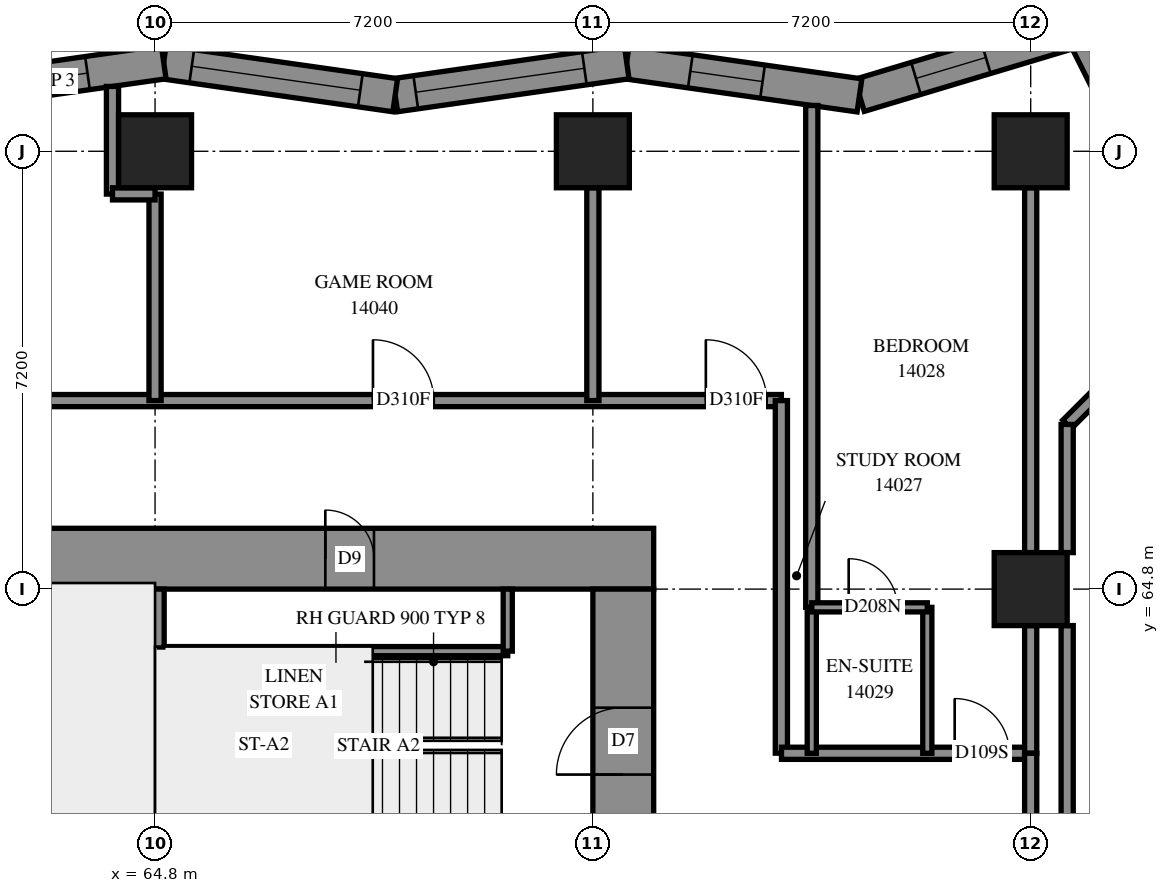
"""IFC4 building model, lengths in metres.
Left out: names, types, materials, properties, quantities, classifications, styles, units other than length and angle.
Written with IfcOpenShell. Run it as: python <this file> out.ifc"""

import sys

from ifc_helpers import new_model, si_unit, direction, frame, frame_2d, origin, origin_2d, place, context, subcontext, project, spatial, polyline, rectangle, outline, extrude, element, fill, save


model = new_model("IFC4")
c1 = context("Model", 3, precision=1e-05, world=origin(), true_north=direction((0.0, 1.0)))
c2 = subcontext(c1, "Body", "Model", "MODEL_VIEW")
j1 = project(units=[si_unit("LENGTHUNIT", "METRE"), si_unit("PLANEANGLEUNIT", "RADIAN")], contexts=[c1])
p1 = place(None, origin())
s1 = spatial("IfcSite", under=j1, at=p1, CompositionType="ELEMENT")
p2 = place(p1, origin())
s2 = spatial("IfcBuilding", under=s1, at=p2, CompositionType="ELEMENT")
p3 = place(p2, frame((0.0, 0.0, 54.2)))
s3 = spatial("IfcBuildingStorey", under=s2, at=p3, CompositionType="ELEMENT", Elevation=54.2)
for number, where, z_axis, x_axis in (
    (1, (64.8, 72.0, 0.0), (0.0, 0.0, 1.0), (1.0, 0.0, 0.0)),
    (2, (72.0, 72.0, 0.0), (0.0, 0.0, 1.0), (1.0, 0.0, 0.0)),
    (3, (79.2, 64.8, 0.0), (0.0, 0.0, 1.0), (1.0, 0.0, 0.0)),
    (4, (79.2, 72.0, 0.0), (0.0, 0.0, 1.0), (1.0, 0.0, 0.0)),
):
    element("IfcColumn", number, at=place(p3, frame(where, z_axis=z_axis, x_axis=x_axis)), inside=s3, PredefinedType="COLUMN", context=c2, shape_type="SweptSolid", body=[
        extrude(rectangle(XDim=1.2, YDim=1.2, at=origin_2d()), origin(), (0.0, 0.0, 1.0), 3.1),
    ])
p4 = place(p3, frame((56.6, 65.3, -0.3), z_axis=(0.0, 0.0, 1.0), x_axis=(1.0, 0.0, 0.0)))
e5 = element("IfcWall", 5, at=p4, inside=s3, PredefinedType="SHEAR", context=c2, shape_type="SweptSolid", body=[
    extrude(rectangle(XDim=16.4, YDim=1.0, at=frame_2d((8.2, 0.0))), origin(), (0.0, 0.0, 1.0), 2.7),
])
p5 = place(p4, frame((11.0, 0.0, 0.3)))
e6 = element("IfcOpeningElement", 6, at=p5, cuts=e5, PredefinedType="OPENING", context=c2, shape_type="SweptSolid", body=[
    extrude(rectangle(XDim=0.8, YDim=2.1, at=frame_2d((0.4, 1.05))), frame((0.0, 0.51, 0.0), z_axis=(0.0, -1.0, 0.0), x_axis=(1.0, 0.0, 0.0)), (0.0, 0.0, 1.0), 1.02),
])
p6 = place(p3, frame((72.5, 50.4, -0.3), z_axis=(0.0, 0.0, 1.0), x_axis=(0.0, 1.0, 0.0)))
e7 = element("IfcWall", 7, at=p6, inside=s3, PredefinedType="SHEAR", context=c2, shape_type="SweptSolid", body=[
    extrude(rectangle(XDim=14.4, YDim=1.0, at=frame_2d((7.2, 0.0))), origin(), (0.0, 0.0, 1.0), 2.7),
])
p7 = place(p6, frame((4.55, 0.0, 0.3)))
e8 = element("IfcOpeningElement", 8, at=p7, cuts=e7, PredefinedType="OPENING", context=c2, shape_type="SweptSolid", body=[
    extrude(rectangle(XDim=1.1, YDim=2.1, at=frame_2d((0.55, 1.05))), frame((0.0, 0.51, 0.0), z_axis=(0.0, -1.0, 0.0), x_axis=(1.0, 0.0, 0.0)), (0.0, 0.0, 1.0), 1.02),
])
p8 = place(p6, frame((11.35, 0.0, 0.3)))
e9 = element("IfcOpeningElement", 9, at=p8, cuts=e7, PredefinedType="OPENING", context=c2, shape_type="SweptSolid", body=[
    extrude(rectangle(XDim=1.1, YDim=2.1, at=frame_2d((0.55, 1.05))), frame((0.0, 0.51, 0.0), z_axis=(0.0, -1.0, 0.0), x_axis=(1.0, 0.0, 0.0)), (0.0, 0.0, 1.0), 1.02),
])
p9 = place(p3, frame((64.8, 60.6, 0.0), z_axis=(0.0, 0.0, 1.0), x_axis=(0.0, 1.0, 0.0)))
e10 = element("IfcWall", 10, at=p9, inside=s3, PredefinedType="SOLIDWALL", context=c2, shape_type="SweptSolid", body=[
    extrude(rectangle(XDim=4.2, YDim=0.3, at=frame_2d((2.1, 0.0))), origin(), (0.0, 0.0, 1.0), 3.1),
])
p10 = place(p3, frame((81.576, 70.922, 0.0), z_axis=(0.0, 0.0, 1.0), x_axis=(-0.4479656887, 0.894050749, 0.0)))
e11 = element("IfcWall", 11, at=p10, inside=s3, PredefinedType="SOLIDWALL", context=c2, shape_type="SweptSolid", body=[
    extrude(outline(polyline([(0.067, -0.275), (3.687, -0.275), (3.225, 0.275), (-0.067, 0.275), (0.067, -0.275)])), origin(), (0.0, 0.0, 1.0), 3.1),
])
p11 = place(p10, frame((0.787, 0.0, 0.5)))
e12 = element("IfcOpeningElement", 12, at=p11, cuts=e11, PredefinedType="OPENING", context=c2, shape_type="SweptSolid", body=[
    extrude(rectangle(XDim=1.2, YDim=2.45, at=frame_2d((0.6, 1.225))), frame((0.0, 0.285, 0.0), z_axis=(0.0, -1.0, 0.0), x_axis=(1.0, 0.0, 0.0)), (0.0, 0.0, 1.0), 0.57),
])
p12 = place(p3, frame((80.028, 74.012, 0.0), z_axis=(0.0, 0.0, 1.0), x_axis=(-0.9578320732, -0.2873285915, 0.0)))
e13 = element("IfcWall", 13, at=p12, inside=s3, PredefinedType="SOLIDWALL", context=c2, shape_type="SweptSolid", body=[
    extrude(outline(polyline([(-0.231, -0.275), (3.744, -0.275), (3.864, 0.275), (0.231, 0.275), (-0.231, -0.275)])), origin(), (0.0, 0.0, 1.0), 3.1),
])
p13 = place(p12, frame((1.634, 0.0, 0.5)))
e14 = element("IfcOpeningElement", 14, at=p13, cuts=e13, PredefinedType="OPENING", context=c2, shape_type="SweptSolid", body=[
    extrude(rectangle(XDim=1.2, YDim=2.45, at=frame_2d((0.6, 1.225))), frame((0.0, 0.285, 0.0), z_axis=(0.0, -1.0, 0.0), x_axis=(1.0, 0.0, 0.0)), (0.0, 0.0, 1.0), 0.57),
])
p14 = place(p3, frame((76.384, 72.919, 0.0), z_axis=(0.0, 0.0, 1.0), x_axis=(-0.9900171381, 0.1409470338, 0.0)))
e15 = element("IfcWall", 15, at=p14, inside=s3, PredefinedType="SOLIDWALL", context=c2, shape_type="SweptSolid", body=[
    extrude(outline(polyline([(0.06, -0.275), (3.906, -0.275), (3.828, 0.275), (-0.06, 0.275), (0.06, -0.275)])), origin(), (0.0, 0.0, 1.0), 3.1),
])
p15 = place(p14, frame((1.61, 0.0, 0.5)))
e16 = element("IfcOpeningElement", 16, at=p15, cuts=e15, PredefinedType="OPENING", context=c2, shape_type="SweptSolid", body=[
    extrude(rectangle(XDim=1.2, YDim=2.45, at=frame_2d((0.6, 1.225))), frame((0.0, 0.285, 0.0), z_axis=(0.0, -1.0, 0.0), x_axis=(1.0, 0.0, 0.0)), (0.0, 0.0, 1.0), 0.57),
])
p16 = place(p3, frame((72.556, 73.464, 0.0), z_axis=(0.0, 0.0, 1.0), x_axis=(-0.990016994, -0.1409480459, 0.0)))
e17 = element("IfcWall", 17, at=p16, inside=s3, PredefinedType="SOLIDWALL", context=c2, shape_type="SweptSolid", body=[
    extrude(outline(polyline([(-0.039, -0.275), (3.806, -0.275), (3.885, 0.275), (0.039, 0.275), (-0.039, -0.275)])), origin(), (0.0, 0.0, 1.0), 3.1),
])
p17 = place(p16, frame((0.704, 0.0, 0.5)))
e18 = element("IfcOpeningElement", 18, at=p17, cuts=e17, PredefinedType="OPENING", context=c2, shape_type="SweptSolid", body=[
    extrude(rectangle(XDim=2.8, YDim=2.45, at=frame_2d((1.4, 1.225))), frame((0.0, 0.285, 0.0), z_axis=(0.0, -1.0, 0.0), x_axis=(1.0, 0.0, 0.0)), (0.0, 0.0, 1.0), 0.57),
])
p18 = place(p3, frame((68.749, 72.922, 0.0), z_axis=(0.0, 0.0, 1.0), x_axis=(-0.990016994, 0.1409480459, 0.0)))
e19 = element("IfcWall", 19, at=p18, inside=s3, PredefinedType="SOLIDWALL", context=c2, shape_type="SweptSolid", body=[
    extrude(outline(polyline([(0.039, -0.275), (3.885, -0.275), (3.806, 0.275), (-0.039, 0.275), (0.039, -0.275)])), origin(), (0.0, 0.0, 1.0), 3.1),
])
p19 = place(p18, frame((0.579, 0.0, 0.5)))
e20 = element("IfcOpeningElement", 20, at=p19, cuts=e19, PredefinedType="OPENING", context=c2, shape_type="SweptSolid", body=[
    extrude(rectangle(XDim=2.8, YDim=2.45, at=frame_2d((1.4, 1.225))), frame((0.0, 0.285, 0.0), z_axis=(0.0, -1.0, 0.0), x_axis=(1.0, 0.0, 0.0)), (0.0, 0.0, 1.0), 0.57),
])
p20 = place(p3, frame((64.942, 73.464, 0.0), z_axis=(0.0, 0.0, 1.0), x_axis=(-0.990016994, -0.1409480459, 0.0)))
e21 = element("IfcWall", 21, at=p20, inside=s3, PredefinedType="SOLIDWALL", context=c2, shape_type="SweptSolid", body=[
    extrude(outline(polyline([(-0.039, -0.275), (3.806, -0.275), (3.885, 0.275), (0.039, 0.275), (-0.039, -0.275)])), origin(), (0.0, 0.0, 1.0), 3.1),
])
p21 = place(p20, frame((1.266, 0.0, 0.7)))
e22 = element("IfcOpeningElement", 22, at=p21, cuts=e21, PredefinedType="OPENING", context=c2, shape_type="SweptSolid", body=[
    extrude(rectangle(XDim=1.8, YDim=2.2, at=frame_2d((0.9, 1.1))), frame((0.0, 0.285, 0.0), z_axis=(0.0, -1.0, 0.0), x_axis=(1.0, 0.0, 0.0)), (0.0, 0.0, 1.0), 0.57),
])
p22 = place(p3, frame((64.95, 63.78, 0.0), z_axis=(0.0, 0.0, 1.0), x_axis=(1.0, 0.0, 0.0)))
e23 = element("IfcWall", 23, at=p22, inside=s3, PredefinedType="PARTITIONING", context=c2, shape_type="SweptSolid", body=[
    extrude(rectangle(XDim=5.65, YDim=0.15, at=frame_2d((2.825, 0.0))), origin(), (0.0, 0.0, 1.0), 3.1),
])
p23 = place(p3, frame((70.6, 63.78, 0.0), z_axis=(0.0, 0.0, 1.0), x_axis=(0.0, 1.0, 0.0)))
e24 = element("IfcWall", 24, at=p23, inside=s3, PredefinedType="PARTITIONING", context=c2, shape_type="SweptSolid", body=[
    extrude(rectangle(XDim=1.02, YDim=0.15, at=frame_2d((0.51, 0.0))), origin(), (0.0, 0.0, 1.0), 3.1),
])
p24 = place(p3, frame((54.5, 67.9, 0.0), z_axis=(0.0, 0.0, 1.0), x_axis=(1.0, 0.0, 0.0)))
e25 = element("IfcWall", 25, at=p24, inside=s3, PredefinedType="PARTITIONING", context=c2, shape_type="SweptSolid", body=[
    extrude(rectangle(XDim=20.6, YDim=0.2, at=frame_2d((10.3, 0.0))), origin(), (0.0, 0.0, 1.0), 3.1),
])
p25 = place(p24, frame((0.198, 0.0, 0.0)))
e26 = element("IfcOpeningElement", 26, at=p25, cuts=e25, PredefinedType="OPENING", context=c2, shape_type="SweptSolid", body=[
    extrude(rectangle(XDim=1.0, YDim=2.1, at=frame_2d((0.5, 1.05))), frame((0.0, 0.11, 0.0), z_axis=(0.0, -1.0, 0.0), x_axis=(1.0, 0.0, 0.0)), (0.0, 0.0, 1.0), 0.22),
])
p26 = place(p24, frame((19.358, 0.0, 0.0)))
e27 = element("IfcOpeningElement", 27, at=p26, cuts=e25, PredefinedType="OPENING", context=c2, shape_type="SweptSolid", body=[
    extrude(rectangle(XDim=1.0, YDim=2.1, at=frame_2d((0.5, 1.05))), frame((0.0, 0.11, 0.0), z_axis=(0.0, -1.0, 0.0), x_axis=(1.0, 0.0, 0.0)), (0.0, 0.0, 1.0), 0.22),
])
p27 = place(p24, frame((6.698, 0.0, 0.0)))
e28 = element("IfcOpeningElement", 28, at=p27, cuts=e25, PredefinedType="OPENING", context=c2, shape_type="SweptSolid", body=[
    extrude(rectangle(XDim=0.9, YDim=2.1, at=frame_2d((0.45, 1.05))), frame((0.0, 0.11, 0.0), z_axis=(0.0, -1.0, 0.0), x_axis=(1.0, 0.0, 0.0)), (0.0, 0.0, 1.0), 0.22),
])
p28 = place(p24, frame((13.884, 0.0, 0.0)))
e29 = element("IfcOpeningElement", 29, at=p28, cuts=e25, PredefinedType="OPENING", context=c2, shape_type="SweptSolid", body=[
    extrude(rectangle(XDim=1.0, YDim=2.1, at=frame_2d((0.5, 1.05))), frame((0.0, 0.11, 0.0), z_axis=(0.0, -1.0, 0.0), x_axis=(1.0, 0.0, 0.0)), (0.0, 0.0, 1.0), 0.22),
])
p29 = place(p3, frame((75.6, 64.5, 0.0), z_axis=(0.0, 0.0, 1.0), x_axis=(0.0, 1.0, 0.0)))
e30 = element("IfcWall", 30, at=p29, inside=s3, PredefinedType="PARTITIONING", context=c2, shape_type="SweptSolid", body=[
    extrude(rectangle(XDim=8.253, YDim=0.2, at=frame_2d((4.127, 0.0))), origin(), (0.0, 0.0, 1.0), 3.1),
])
p30 = place(p3, frame((79.2, 65.4, 0.0), z_axis=(0.0, 0.0, 1.0), x_axis=(0.0, 1.0, 0.0)))
e31 = element("IfcWall", 31, at=p30, inside=s3, PredefinedType="PARTITIONING", context=c2, shape_type="SweptSolid", body=[
    extrude(rectangle(XDim=6.0, YDim=0.2, at=frame_2d((3.0, 0.0))), origin(), (0.0, 0.0, 1.0), 3.1),
])
p31 = place(p3, frame((75.1, 62.102, 0.0), z_axis=(0.0, 0.0, 1.0), x_axis=(0.0, 1.0, 0.0)))
e32 = element("IfcWall", 32, at=p31, inside=s3, PredefinedType="PARTITIONING", context=c2, shape_type="SweptSolid", body=[
    extrude(rectangle(XDim=5.798, YDim=0.2, at=frame_2d((2.899, 0.0))), origin(), (0.0, 0.0, 1.0), 3.1),
])
p32 = place(p3, frame((79.8, 59.45, 0.0), z_axis=(0.0, 0.0, 1.0), x_axis=(0.0, 1.0, 0.0)))
e33 = element("IfcWall", 33, at=p32, inside=s3, PredefinedType="PARTITIONING", context=c2, shape_type="SweptSolid", body=[
    extrude(rectangle(XDim=4.75, YDim=0.2, at=frame_2d((2.375, 0.0))), origin(), (0.0, 0.0, 1.0), 3.1),
])
p33 = place(p3, frame((75.102, 62.1, 0.0), z_axis=(0.0, 0.0, 1.0), x_axis=(1.0, 0.0, 0.0)))
e34 = element("IfcWall", 34, at=p33, inside=s3, PredefinedType="PARTITIONING", context=c2, shape_type="SweptSolid", body=[
    extrude(rectangle(XDim=4.098, YDim=0.2, at=frame_2d((2.049, 0.0))), origin(), (0.0, 0.0, 1.0), 3.1),
])
p34 = place(p33, frame((2.848, 0.0, 0.0)))
e35 = element("IfcOpeningElement", 35, at=p34, cuts=e34, PredefinedType="OPENING", context=c2, shape_type="SweptSolid", body=[
    extrude(rectangle(XDim=0.9, YDim=2.1, at=frame_2d((0.45, 1.05))), frame((0.0, 0.11, 0.0), z_axis=(0.0, -1.0, 0.0), x_axis=(1.0, 0.0, 0.0)), (0.0, 0.0, 1.0), 0.22),
])
p35 = place(p3, frame((79.799, 67.509, 0.0), z_axis=(0.0, 0.0, 1.0), x_axis=(0.7070927914, 0.7071207707, 0.0)))
e36 = element("IfcWall", 36, at=p35, inside=s3, PredefinedType="PARTITIONING", context=c2, shape_type="SweptSolid", body=[
    extrude(rectangle(XDim=3.574, YDim=0.2, at=frame_2d((1.787, 0.0))), origin(), (0.0, 0.0, 1.0), 3.1),
])
p36 = place(p3, frame((72.0, 67.9, 0.0), z_axis=(0.0, 0.0, 1.0), x_axis=(0.0, 1.0, 0.0)))
e37 = element("IfcWall", 37, at=p36, inside=s3, PredefinedType="PARTITIONING", context=c2, shape_type="SweptSolid", body=[
    extrude(rectangle(XDim=3.5, YDim=0.2, at=frame_2d((1.75, 0.0))), origin(), (0.0, 0.0, 1.0), 3.1),
])
p37 = place(p3, frame((64.8, 67.9, 0.0), z_axis=(0.0, 0.0, 1.0), x_axis=(0.0, 1.0, 0.0)))
e38 = element("IfcWall", 38, at=p37, inside=s3, PredefinedType="PARTITIONING", context=c2, shape_type="SweptSolid", body=[
    extrude(rectangle(XDim=3.396, YDim=0.2, at=frame_2d((1.698, 0.0))), origin(), (0.0, 0.0, 1.0), 3.1),
])
for number, where, z_axis, x_axis in (
    (39, (75.6, 62.1, 0.0), (0.0, 0.0, 1.0), (0.0, 1.0, 0.0)),
    (40, (77.5, 62.1, 0.0), (0.0, 0.0, 1.0), (0.0, 1.0, 0.0)),
):
    element("IfcWall", number, at=place(p3, frame(where, z_axis=z_axis, x_axis=x_axis)), inside=s3, PredefinedType="PARTITIONING", context=c2, shape_type="SweptSolid", body=[
        extrude(rectangle(XDim=2.4, YDim=0.15, at=frame_2d((1.2, 0.0))), origin(), (0.0, 0.0, 1.0), 3.1),
    ])
p38 = place(p3, frame((79.8, 65.4, 0.0), z_axis=(0.0, 0.0, 1.0), x_axis=(0.0, 1.0, 0.0)))
e41 = element("IfcWall", 41, at=p38, inside=s3, PredefinedType="PARTITIONING", context=c2, shape_type="SweptSolid", body=[
    extrude(rectangle(XDim=2.108, YDim=0.2, at=frame_2d((1.054, 0.0))), origin(), (0.0, 0.0, 1.0), 3.1),
])
p39 = place(p3, frame((79.2, 62.1, 0.0), z_axis=(0.0, 0.0, 1.0), x_axis=(0.0, 1.0, 0.0)))
e42 = element("IfcWall", 42, at=p39, inside=s3, PredefinedType="PARTITIONING", context=c2, shape_type="SweptSolid", body=[
    extrude(rectangle(XDim=2.1, YDim=0.2, at=frame_2d((1.05, 0.0))), origin(), (0.0, 0.0, 1.0), 3.1),
])
p40 = place(p3, frame((75.6, 64.5, 0.0), z_axis=(0.0, 0.0, 1.0), x_axis=(1.0, 0.0, 0.0)))
e43 = element("IfcWall", 43, at=p40, inside=s3, PredefinedType="PARTITIONING", context=c2, shape_type="SweptSolid", body=[
    extrude(rectangle(XDim=1.9, YDim=0.15, at=frame_2d((0.95, 0.0))), origin(), (0.0, 0.0, 1.0), 3.1),
])
p41 = place(p40, frame((0.607, 0.0, 0.0)))
e44 = element("IfcOpeningElement", 44, at=p41, cuts=e43, PredefinedType="OPENING", context=c2, shape_type="SweptSolid", body=[
    extrude(rectangle(XDim=0.8, YDim=2.1, at=frame_2d((0.4, 1.05))), frame((0.0, 0.085, 0.0), z_axis=(0.0, -1.0, 0.0), x_axis=(1.0, 0.0, 0.0)), (0.0, 0.0, 1.0), 0.17),
])
p42 = place(p3, frame((79.2, 60.3, 0.0), z_axis=(0.0, 0.0, 1.0), x_axis=(0.0, 1.0, 0.0)))
e45 = element("IfcWall", 45, at=p42, inside=s3, PredefinedType="PARTITIONING", context=c2, shape_type="SweptSolid", body=[
    extrude(rectangle(XDim=1.8, YDim=0.2, at=frame_2d((0.9, 0.0))), origin(), (0.0, 0.0, 1.0), 3.1),
])
p43 = place(p3, frame((64.1, 71.296, 0.0), z_axis=(0.0, 0.0, 1.0), x_axis=(0.0, 1.0, 0.0)))
e46 = element("IfcWall", 46, at=p43, inside=s3, PredefinedType="PARTITIONING", context=c2, shape_type="SweptSolid", body=[
    extrude(rectangle(XDim=1.771, YDim=0.2, at=frame_2d((0.885, 0.0))), origin(), (0.0, 0.0, 1.0), 3.1),
])
p44 = place(p3, frame((64.1, 71.3, 0.0), z_axis=(0.0, 0.0, 1.0), x_axis=(1.0, 0.0, 0.0)))
e47 = element("IfcWall", 47, at=p44, inside=s3, PredefinedType="PARTITIONING", context=c2, shape_type="SweptSolid", body=[
    extrude(rectangle(XDim=0.7, YDim=0.2, at=frame_2d((0.35, 0.0))), origin(), (0.0, 0.0, 1.0), 3.1),
])
p45 = place(p13, origin())
e48 = element("IfcWindow", 48, at=p45, inside=s3, PartitioningType="SINGLE_PANEL", PredefinedType="WINDOW", context=c2, shape_type="SweptSolid", body=[
    extrude(rectangle(XDim=1.2, YDim=2.45, at=frame_2d((0.6, 1.225))), frame((0.0, 0.155, 0.0), z_axis=(0.0, -1.0, 0.0), x_axis=(1.0, 0.0, 0.0)), (0.0, 0.0, 1.0), 0.06),
])
fill(e14, e48)
p46 = place(p15, origin())
e49 = element("IfcWindow", 49, at=p46, inside=s3, PartitioningType="SINGLE_PANEL", PredefinedType="WINDOW", context=c2, shape_type="SweptSolid", body=[
    extrude(rectangle(XDim=1.2, YDim=2.45, at=frame_2d((0.6, 1.225))), frame((0.0, 0.155, 0.0), z_axis=(0.0, -1.0, 0.0), x_axis=(1.0, 0.0, 0.0)), (0.0, 0.0, 1.0), 0.06),
])
fill(e16, e49)
p47 = place(p17, origin())
e50 = element("IfcWindow", 50, at=p47, inside=s3, PartitioningType="SINGLE_PANEL", PredefinedType="WINDOW", context=c2, shape_type="SweptSolid", body=[
    extrude(rectangle(XDim=2.8, YDim=2.45, at=frame_2d((1.4, 1.225))), frame((0.0, 0.155, 0.0), z_axis=(0.0, -1.0, 0.0), x_axis=(1.0, 0.0, 0.0)), (0.0, 0.0, 1.0), 0.06),
])
fill(e18, e50)
p48 = place(p19, origin())
e51 = element("IfcWindow", 51, at=p48, inside=s3, PartitioningType="SINGLE_PANEL", PredefinedType="WINDOW", context=c2, shape_type="SweptSolid", body=[
    extrude(rectangle(XDim=2.8, YDim=2.45, at=frame_2d((1.4, 1.225))), frame((0.0, 0.155, 0.0), z_axis=(0.0, -1.0, 0.0), x_axis=(1.0, 0.0, 0.0)), (0.0, 0.0, 1.0), 0.06),
])
fill(e20, e51)
p49 = place(p5, origin())
e52 = element("IfcDoor", 52, at=p49, inside=s3, OperationType="SINGLE_SWING_RIGHT", PredefinedType="DOOR", context=c2, shape_type="SweptSolid", body=[
    extrude(rectangle(XDim=0.8, YDim=2.1, at=frame_2d((0.4, 1.05))), frame((0.0, -0.44, 0.0), z_axis=(0.0, -1.0, 0.0), x_axis=(1.0, 0.0, 0.0)), (0.0, 0.0, 1.0), 0.05),
])
fill(e6, e52)
p50 = place(p8, origin())
e53 = element("IfcDoor", 53, at=p50, inside=s3, OperationType="SINGLE_SWING_RIGHT", PredefinedType="DOOR", context=c2, shape_type="SweptSolid", body=[
    extrude(rectangle(XDim=1.1, YDim=2.1, at=frame_2d((0.55, 1.05))), frame((0.0, 0.025, 0.0), z_axis=(0.0, -1.0, 0.0), x_axis=(1.0, 0.0, 0.0)), (0.0, 0.0, 1.0), 0.05),
])
fill(e9, e53)
p51 = place(p26, origin())
e54 = element("IfcDoor", 54, at=p51, inside=s3, OperationType="SINGLE_SWING_RIGHT", PredefinedType="DOOR", context=c2, shape_type="SweptSolid", body=[
    extrude(rectangle(XDim=1.0, YDim=2.1, at=frame_2d((0.5, 1.05))), frame((0.0, 0.025, 0.0), z_axis=(0.0, -1.0, 0.0), x_axis=(1.0, 0.0, 0.0)), (0.0, 0.0, 1.0), 0.05),
])
fill(e27, e54)
p52 = place(p34, origin())
e55 = element("IfcDoor", 55, at=p52, inside=s3, OperationType="SINGLE_SWING_LEFT", PredefinedType="DOOR", context=c2, shape_type="SweptSolid", body=[
    extrude(rectangle(XDim=0.9, YDim=2.1, at=frame_2d((0.45, 1.05))), frame((0.0, 0.025, 0.0), z_axis=(0.0, -1.0, 0.0), x_axis=(1.0, 0.0, 0.0)), (0.0, 0.0, 1.0), 0.05),
])
fill(e35, e55)
p53 = place(p41, origin())
e56 = element("IfcDoor", 56, at=p53, inside=s3, OperationType="SINGLE_SWING_RIGHT", PredefinedType="DOOR", context=c2, shape_type="SweptSolid", body=[
    extrude(rectangle(XDim=0.8, YDim=2.1, at=frame_2d((0.4, 1.05))), frame((0.0, 0.025, 0.0), z_axis=(0.0, -1.0, 0.0), x_axis=(1.0, 0.0, 0.0)), (0.0, 0.0, 1.0), 0.05),
])
fill(e44, e56)
p54 = place(p28, origin())
e57 = element("IfcDoor", 57, at=p54, inside=s3, OperationType="SINGLE_SWING_RIGHT", PredefinedType="DOOR", context=c2, shape_type="SweptSolid", body=[
    extrude(rectangle(XDim=1.0, YDim=2.1, at=frame_2d((0.5, 1.05))), frame((0.0, 0.025, 0.0), z_axis=(0.0, -1.0, 0.0), x_axis=(1.0, 0.0, 0.0)), (0.0, 0.0, 1.0), 0.05),
])
fill(e29, e57)
p55 = place(p21, origin())
e58 = element("IfcWindow", 58, at=p55, inside=s3, PartitioningType="SINGLE_PANEL", PredefinedType="WINDOW", context=c2, shape_type="SweptSolid", body=[
    extrude(rectangle(XDim=1.8, YDim=2.2, at=frame_2d((0.9, 1.1))), frame((0.0, 0.155, 0.0), z_axis=(0.0, -1.0, 0.0), x_axis=(1.0, 0.0, 0.0)), (0.0, 0.0, 1.0), 0.06),
])
fill(e22, e58)
save(model, sys.argv[1])
